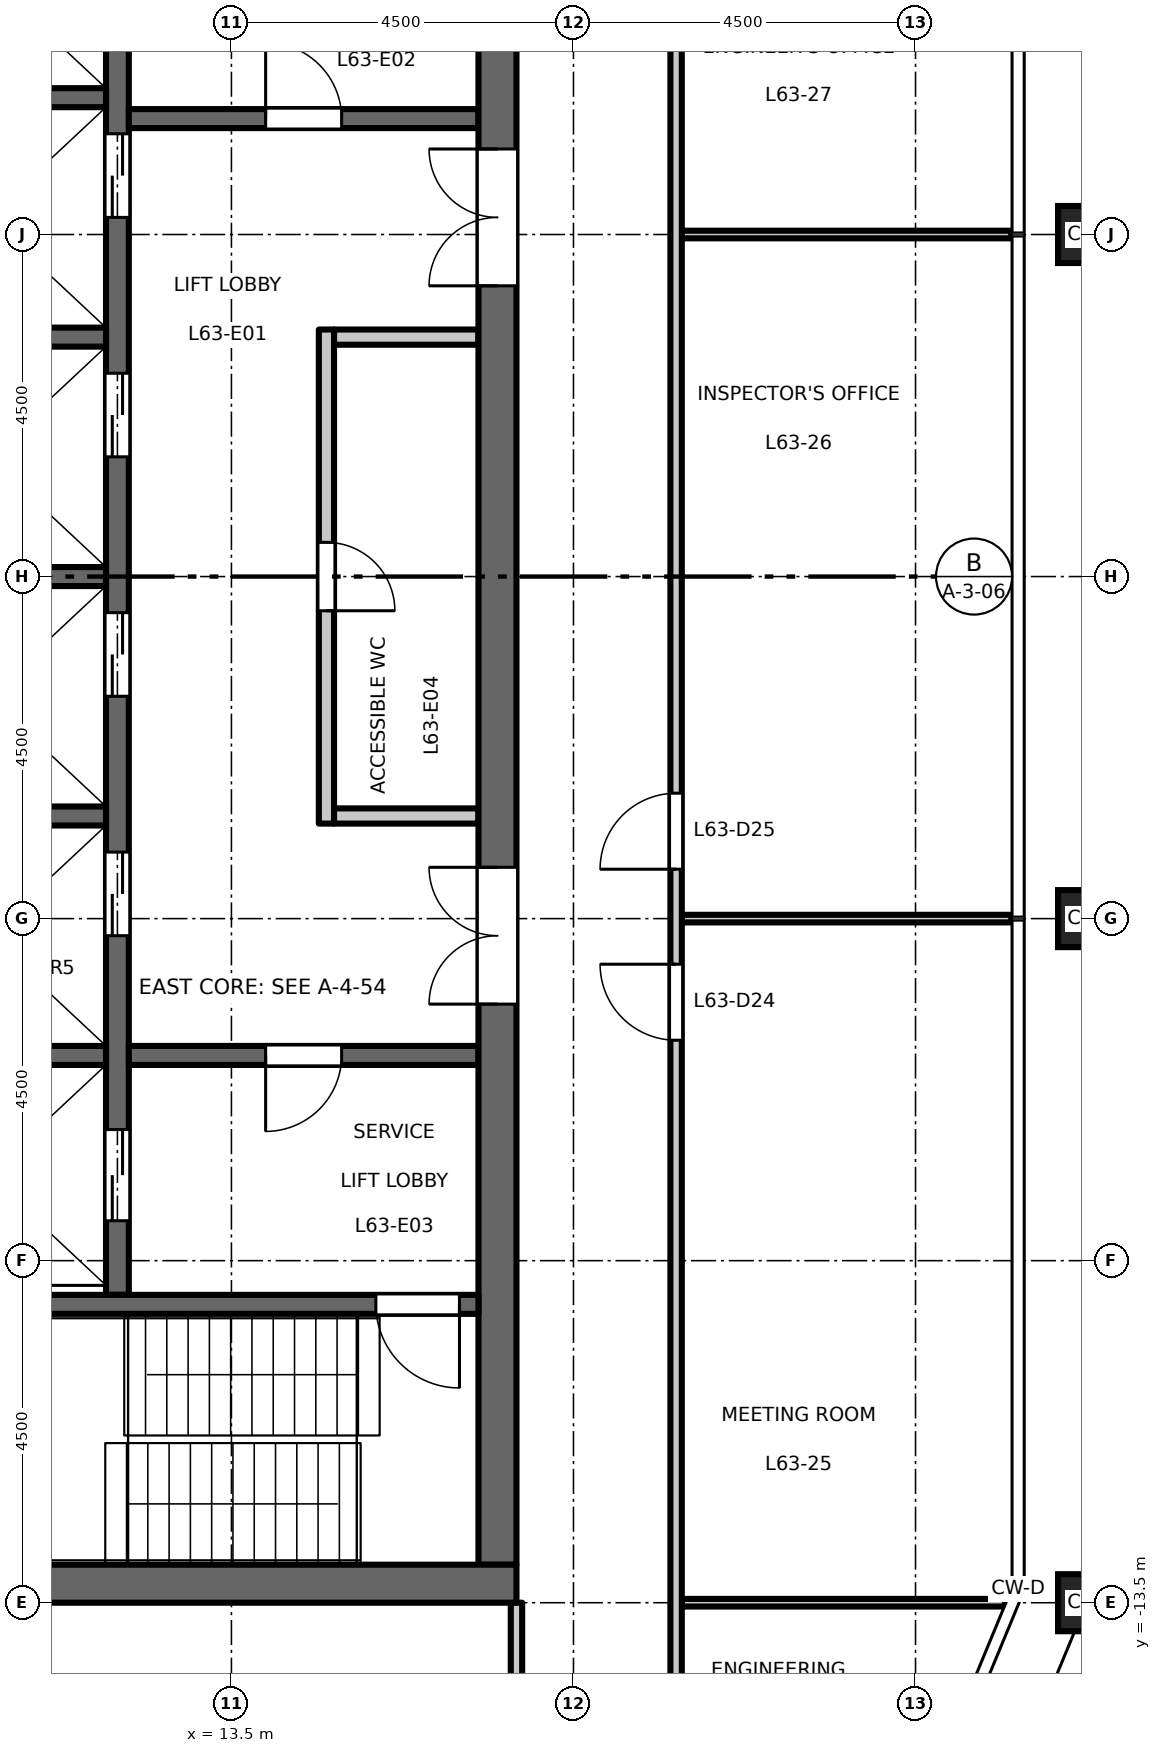
"""IFC4 building model, lengths in metres.
Left out: names, types, materials, properties, quantities, classifications, styles, units other than length and angle.
Written with IfcOpenShell. Run it as: python <this file> out.ifc"""

import sys

from ifc_helpers import new_model, si_unit, direction, frame, frame_2d, origin, origin_2d, place, context, subcontext, project, spatial, rectangle, hollow_rectangle, extrude, element, fill, save


model = new_model("IFC4")
c1 = context("Model", 3, precision=1e-05, world=origin(), true_north=direction((0.0, 1.0)))
c2 = subcontext(c1, "Body", "Model", "MODEL_VIEW")
j1 = project(units=[si_unit("LENGTHUNIT", "METRE"), si_unit("PLANEANGLEUNIT", "RADIAN")], contexts=[c1])
p1 = place(None, origin())
s1 = spatial("IfcSite", under=j1, at=p1, CompositionType="ELEMENT")
p2 = place(p1, origin())
s2 = spatial("IfcBuilding", under=s1, at=p2, CompositionType="ELEMENT")
p3 = place(p2, frame((0.0, 0.0, 294.2)))
s3 = spatial("IfcBuildingStorey", under=s2, at=p3, CompositionType="ELEMENT", Elevation=294.2)
for number, where, z_axis, x_axis in (
    (1, (24.75, -13.5, 0.0), (0.0, 0.0, 1.0), (1.0, 0.0, 0.0)),
    (2, (24.75, -4.5, 0.0), (0.0, 0.0, 1.0), (1.0, 0.0, 0.0)),
    (3, (24.75, 4.5, 0.0), (0.0, 0.0, 1.0), (1.0, 0.0, 0.0)),
):
    element("IfcColumn", number, at=place(p3, frame(where, z_axis=z_axis, x_axis=x_axis)), inside=s3, PredefinedType="COLUMN", context=c2, shape_type="SweptSolid", body=[
        extrude(hollow_rectangle(XDim=0.75, YDim=0.75, WallThickness=0.04, at=origin_2d()), origin(), (0.0, 0.0, 1.0), 4.5),
    ])
p4 = place(p3, frame((14.75, -3.25, 0.0), z_axis=(0.0, 0.0, 1.0), x_axis=(0.0, 1.0, 0.0)))
e4 = element("IfcWall", 4, at=p4, inside=s3, PredefinedType="PARTITIONING", context=c2, shape_type="SweptSolid", body=[
    extrude(rectangle(XDim=6.5, YDim=0.2, at=frame_2d((3.25, 0.0))), origin(), (0.0, 0.0, 1.0), 4.35),
])
p5 = place(p4, frame((2.8, 0.0, 0.0)))
e5 = element("IfcOpeningElement", 5, at=p5, cuts=e4, PredefinedType="OPENING", context=c2, shape_type="SweptSolid", body=[
    extrude(rectangle(XDim=0.9, YDim=2.1, at=frame_2d((0.45, 1.05))), frame((0.0, 0.11, 0.0), z_axis=(0.0, -1.0, 0.0), x_axis=(1.0, 0.0, 0.0)), (0.0, 0.0, 1.0), 0.22),
])
for number, where, z_axis, x_axis in (
    (6, (14.85, 3.15, 0.0), (0.0, 0.0, 1.0), (1.0, 0.0, 0.0)),
    (7, (14.85, -3.15, 0.0), (0.0, 0.0, 1.0), (1.0, 0.0, 0.0)),
):
    element("IfcWall", number, at=place(p3, frame(where, z_axis=z_axis, x_axis=x_axis)), inside=s3, PredefinedType="PARTITIONING", context=c2, shape_type="SweptSolid", body=[
        extrude(rectangle(XDim=1.9, YDim=0.2, at=frame_2d((0.95, 0.0))), origin(), (0.0, 0.0, 1.0), 4.35),
    ])
p6 = place(p3, frame((12.0, -9.45, 0.0), z_axis=(0.0, 0.0, 1.0), x_axis=(0.0, 1.0, 0.0)))
e8 = element("IfcWall", 8, at=p6, inside=s3, PredefinedType="SHEAR", context=c2, shape_type="SweptSolid", body=[
    extrude(rectangle(XDim=18.9, YDim=0.3, at=frame_2d((9.45, 0.0))), origin(), (0.0, 0.0, 1.0), 4.35),
])
p7 = place(p6, frame((4.725, 0.0, 0.0)))
e9 = element("IfcOpeningElement", 9, at=p7, cuts=e8, PredefinedType="OPENING", context=c2, shape_type="SweptSolid", body=[
    extrude(rectangle(XDim=1.1, YDim=2.1, at=frame_2d((0.55, 1.05))), frame((0.0, 0.16, 0.0), z_axis=(0.0, -1.0, 0.0), x_axis=(1.0, 0.0, 0.0)), (0.0, 0.0, 1.0), 0.32),
])
p8 = place(p6, frame((7.875, 0.0, 0.0)))
e10 = element("IfcOpeningElement", 10, at=p8, cuts=e8, PredefinedType="OPENING", context=c2, shape_type="SweptSolid", body=[
    extrude(rectangle(XDim=1.1, YDim=2.1, at=frame_2d((0.55, 1.05))), frame((0.0, 0.16, 0.0), z_axis=(0.0, -1.0, 0.0), x_axis=(1.0, 0.0, 0.0)), (0.0, 0.0, 1.0), 0.32),
])
p9 = place(p6, frame((11.025, 0.0, 0.0)))
e11 = element("IfcOpeningElement", 11, at=p9, cuts=e8, PredefinedType="OPENING", context=c2, shape_type="SweptSolid", body=[
    extrude(rectangle(XDim=1.1, YDim=2.1, at=frame_2d((0.55, 1.05))), frame((0.0, 0.16, 0.0), z_axis=(0.0, -1.0, 0.0), x_axis=(1.0, 0.0, 0.0)), (0.0, 0.0, 1.0), 0.32),
])
p10 = place(p6, frame((14.175, 0.0, 0.0)))
e12 = element("IfcOpeningElement", 12, at=p10, cuts=e8, PredefinedType="OPENING", context=c2, shape_type="SweptSolid", body=[
    extrude(rectangle(XDim=1.1, YDim=2.1, at=frame_2d((0.55, 1.05))), frame((0.0, 0.16, 0.0), z_axis=(0.0, -1.0, 0.0), x_axis=(1.0, 0.0, 0.0)), (0.0, 0.0, 1.0), 0.32),
])
p11 = place(p6, frame((16.725, 0.0, 0.0)))
e13 = element("IfcOpeningElement", 13, at=p11, cuts=e8, PredefinedType="OPENING", context=c2, shape_type="SweptSolid", body=[
    extrude(rectangle(XDim=1.2, YDim=2.1, at=frame_2d((0.6, 1.05))), frame((0.0, 0.16, 0.0), z_axis=(0.0, -1.0, 0.0), x_axis=(1.0, 0.0, 0.0)), (0.0, 0.0, 1.0), 0.32),
])
p12 = place(p6, frame((0.975, 0.0, 0.0)))
e14 = element("IfcOpeningElement", 14, at=p12, cuts=e8, PredefinedType="OPENING", context=c2, shape_type="SweptSolid", body=[
    extrude(rectangle(XDim=1.2, YDim=2.1, at=frame_2d((0.6, 1.05))), frame((0.0, 0.16, 0.0), z_axis=(0.0, -1.0, 0.0), x_axis=(1.0, 0.0, 0.0)), (0.0, 0.0, 1.0), 0.32),
])
p13 = place(p3, frame((12.15, 6.025, 0.0), z_axis=(0.0, 0.0, 1.0), x_axis=(1.0, 0.0, 0.0)))
e15 = element("IfcWall", 15, at=p13, inside=s3, PredefinedType="SHEAR", context=c2, shape_type="SweptSolid", body=[
    extrude(rectangle(XDim=4.6, YDim=0.25, at=frame_2d((2.3, 0.0))), origin(), (0.0, 0.0, 1.0), 4.35),
])
p14 = place(p13, frame((1.8, 0.0, 0.0)))
e16 = element("IfcOpeningElement", 16, at=p14, cuts=e15, PredefinedType="OPENING", context=c2, shape_type="SweptSolid", body=[
    extrude(rectangle(XDim=1.0, YDim=2.1, at=frame_2d((0.5, 1.05))), frame((0.0, 0.135, 0.0), z_axis=(0.0, -1.0, 0.0), x_axis=(1.0, 0.0, 0.0)), (0.0, 0.0, 1.0), 0.27),
])
p15 = place(p3, frame((12.15, -6.3, 0.0), z_axis=(0.0, 0.0, 1.0), x_axis=(1.0, 0.0, 0.0)))
e17 = element("IfcWall", 17, at=p15, inside=s3, PredefinedType="SHEAR", context=c2, shape_type="SweptSolid", body=[
    extrude(rectangle(XDim=4.6, YDim=0.25, at=frame_2d((2.3, 0.0))), origin(), (0.0, 0.0, 1.0), 4.35),
])
p16 = place(p15, frame((1.8, 0.0, 0.0)))
e18 = element("IfcOpeningElement", 18, at=p16, cuts=e17, PredefinedType="OPENING", context=c2, shape_type="SweptSolid", body=[
    extrude(rectangle(XDim=1.0, YDim=2.1, at=frame_2d((0.5, 1.05))), frame((0.0, 0.135, 0.0), z_axis=(0.0, -1.0, 0.0), x_axis=(1.0, 0.0, 0.0)), (0.0, 0.0, 1.0), 0.27),
])
p17 = place(p3, frame((17.0, -13.0, 0.0), z_axis=(0.0, 0.0, 1.0), x_axis=(0.0, 1.0, 0.0)))
e19 = element("IfcWall", 19, at=p17, inside=s3, PredefinedType="SHEAR", context=c2, shape_type="SweptSolid", body=[
    extrude(rectangle(XDim=26.0, YDim=0.5, at=frame_2d((13.0, 0.0))), origin(), (0.0, 0.0, 1.0), 4.35),
])
p18 = place(p17, frame((16.825, 0.0, 0.0)))
e20 = element("IfcOpeningElement", 20, at=p18, cuts=e19, PredefinedType="OPENING", context=c2, shape_type="SweptSolid", body=[
    extrude(rectangle(XDim=1.8, YDim=2.1, at=frame_2d((0.9, 1.05))), frame((0.0, 0.26, 0.0), z_axis=(0.0, -1.0, 0.0), x_axis=(1.0, 0.0, 0.0)), (0.0, 0.0, 1.0), 0.52),
])
p19 = place(p17, frame((7.375, 0.0, 0.0)))
e21 = element("IfcOpeningElement", 21, at=p19, cuts=e19, PredefinedType="OPENING", context=c2, shape_type="SweptSolid", body=[
    extrude(rectangle(XDim=1.8, YDim=2.1, at=frame_2d((0.9, 1.05))), frame((0.0, 0.26, 0.0), z_axis=(0.0, -1.0, 0.0), x_axis=(1.0, 0.0, 0.0)), (0.0, 0.0, 1.0), 0.52),
])
for number, where, z_axis, x_axis in (
    (22, (8.75, 0.0, 0.0), (0.0, 0.0, 1.0), (1.0, 0.0, 0.0)),
    (23, (8.75, 3.15, 0.0), (0.0, 0.0, 1.0), (1.0, 0.0, 0.0)),
    (24, (8.75, 6.3, 0.0), (0.0, 0.0, 1.0), (1.0, 0.0, 0.0)),
    (25, (8.75, -3.15, 0.0), (0.0, 0.0, 1.0), (1.0, 0.0, 0.0)),
    (26, (8.75, -6.3, 0.0), (0.0, 0.0, 1.0), (1.0, 0.0, 0.0)),
):
    element("IfcWall", number, at=place(p3, frame(where, z_axis=z_axis, x_axis=x_axis)), inside=s3, PredefinedType="SHEAR", context=c2, shape_type="SweptSolid", body=[
        extrude(rectangle(XDim=3.1, YDim=0.25, at=frame_2d((1.55, 0.0))), origin(), (0.0, 0.0, 1.0), 4.35),
    ])
p20 = place(p3, frame((8.75, -9.575, 0.0), z_axis=(0.0, 0.0, 1.0), x_axis=(1.0, 0.0, 0.0)))
e27 = element("IfcWall", 27, at=p20, inside=s3, PredefinedType="SHEAR", context=c2, shape_type="SweptSolid", body=[
    extrude(rectangle(XDim=8.0, YDim=0.25, at=frame_2d((4.0, 0.0))), origin(), (0.0, 0.0, 1.0), 4.35),
])
p21 = place(p20, frame((6.65, 0.0, 0.0)))
e28 = element("IfcOpeningElement", 28, at=p21, cuts=e27, PredefinedType="OPENING", context=c2, shape_type="SweptSolid", body=[
    extrude(rectangle(XDim=1.1, YDim=2.1, at=frame_2d((0.55, 1.05))), frame((0.0, 0.135, 0.0), z_axis=(0.0, -1.0, 0.0), x_axis=(1.0, 0.0, 0.0)), (0.0, 0.0, 1.0), 0.27),
])
p22 = place(p3, frame((8.25, -13.25, 0.0), z_axis=(0.0, 0.0, 1.0), x_axis=(1.0, 0.0, 0.0)))
e29 = element("IfcWall", 29, at=p22, inside=s3, PredefinedType="SHEAR", context=c2, shape_type="SweptSolid", body=[
    extrude(rectangle(XDim=9.0, YDim=0.5, at=frame_2d((4.5, 0.0))), origin(), (0.0, 0.0, 1.0), 4.35),
])
p23 = place(p3, frame((19.425, -13.5, 0.0), z_axis=(0.0, 0.0, 1.0), x_axis=(1.0, 0.0, 0.0)))
e30 = element("IfcWall", 30, at=p23, inside=s3, PredefinedType="PARTITIONING", context=c2, shape_type="SweptSolid", body=[
    extrude(rectangle(XDim=4.253, YDim=0.1, at=frame_2d((2.126, 0.0))), origin(), (0.0, 0.0, 1.0), 4.35),
])
for number, where, z_axis, x_axis in (
    (31, (19.425, -4.5, 0.0), (0.0, 0.0, 1.0), (1.0, 0.0, 0.0)),
    (32, (19.425, 4.5, 0.0), (0.0, 0.0, 1.0), (1.0, 0.0, 0.0)),
):
    element("IfcWall", number, at=place(p3, frame(where, z_axis=z_axis, x_axis=x_axis)), inside=s3, PredefinedType="PARTITIONING", context=c2, shape_type="SweptSolid", body=[
        extrude(rectangle(XDim=4.335, YDim=0.1, at=frame_2d((2.167, 0.0))), origin(), (0.0, 0.0, 1.0), 4.35),
    ])
p24 = place(p3, frame((17.25, -16.425, 0.0), z_axis=(0.0, 0.0, 1.0), x_axis=(0.0, 1.0, 0.0)))
e33 = element("IfcWall", 33, at=p24, inside=s3, PredefinedType="PARTITIONING", context=c2, shape_type="SweptSolid", body=[
    extrude(rectangle(XDim=2.925, YDim=0.15, at=frame_2d((1.462, 0.0))), origin(), (0.0, 0.0, 1.0), 4.35),
])
p25 = place(p3, frame((19.35, -16.425, 0.0), z_axis=(0.0, 0.0, 1.0), x_axis=(0.0, 1.0, 0.0)))
e34 = element("IfcWall", 34, at=p25, inside=s3, PredefinedType="PARTITIONING", context=c2, shape_type="SweptSolid", body=[
    extrude(rectangle(XDim=32.85, YDim=0.15, at=frame_2d((16.425, 0.0))), origin(), (0.0, 0.0, 1.0), 4.35),
])
p26 = place(p25, frame((10.325, 0.0, 0.0)))
e35 = element("IfcOpeningElement", 35, at=p26, cuts=e34, PredefinedType="OPENING", context=c2, shape_type="SweptSolid", body=[
    extrude(rectangle(XDim=1.0, YDim=2.1, at=frame_2d((0.5, 1.05))), frame((0.0, 0.085, 0.0), z_axis=(0.0, -1.0, 0.0), x_axis=(1.0, 0.0, 0.0)), (0.0, 0.0, 1.0), 0.17),
])
p27 = place(p25, frame((12.575, 0.0, 0.0)))
e36 = element("IfcOpeningElement", 36, at=p27, cuts=e34, PredefinedType="OPENING", context=c2, shape_type="SweptSolid", body=[
    extrude(rectangle(XDim=1.0, YDim=2.1, at=frame_2d((0.5, 1.05))), frame((0.0, 0.085, 0.0), z_axis=(0.0, -1.0, 0.0), x_axis=(1.0, 0.0, 0.0)), (0.0, 0.0, 1.0), 0.17),
])
p28 = place(p25, frame((28.325, 0.0, 0.0)))
e37 = element("IfcOpeningElement", 37, at=p28, cuts=e34, PredefinedType="OPENING", context=c2, shape_type="SweptSolid", body=[
    extrude(rectangle(XDim=1.0, YDim=2.1, at=frame_2d((0.5, 1.05))), frame((0.0, 0.085, 0.0), z_axis=(0.0, -1.0, 0.0), x_axis=(1.0, 0.0, 0.0)), (0.0, 0.0, 1.0), 0.17),
])
p29 = place(p14, origin())
e38 = element("IfcDoor", 38, at=p29, inside=s3, OperationType="SINGLE_SWING_RIGHT", PredefinedType="DOOR", context=c2, shape_type="SweptSolid", body=[
    extrude(rectangle(XDim=1.0, YDim=2.1, at=frame_2d((0.5, 1.05))), frame((0.0, 0.025, 0.0), z_axis=(0.0, -1.0, 0.0), x_axis=(1.0, 0.0, 0.0)), (0.0, 0.0, 1.0), 0.05),
])
fill(e16, e38)
p30 = place(p16, origin())
e39 = element("IfcDoor", 39, at=p30, inside=s3, OperationType="SINGLE_SWING_LEFT", PredefinedType="DOOR", context=c2, shape_type="SweptSolid", body=[
    extrude(rectangle(XDim=1.0, YDim=2.1, at=frame_2d((0.5, 1.05))), frame((0.0, 0.025, 0.0), z_axis=(0.0, -1.0, 0.0), x_axis=(1.0, 0.0, 0.0)), (0.0, 0.0, 1.0), 0.05),
])
fill(e18, e39)
p31 = place(p21, origin())
e40 = element("IfcDoor", 40, at=p31, inside=s3, OperationType="SINGLE_SWING_RIGHT", PredefinedType="DOOR", context=c2, shape_type="SweptSolid", body=[
    extrude(rectangle(XDim=1.1, YDim=2.1, at=frame_2d((0.55, 1.05))), frame((0.0, 0.025, 0.0), z_axis=(0.0, -1.0, 0.0), x_axis=(1.0, 0.0, 0.0)), (0.0, 0.0, 1.0), 0.05),
])
fill(e28, e40)
p32 = place(p18, origin())
e41 = element("IfcDoor", 41, at=p32, inside=s3, OperationType="DOUBLE_DOOR_DOUBLE_SWING", PredefinedType="DOOR", context=c2, shape_type="SweptSolid", body=[
    extrude(rectangle(XDim=1.8, YDim=2.1, at=frame_2d((0.9, 1.05))), frame((0.0, 0.025, 0.0), z_axis=(0.0, -1.0, 0.0), x_axis=(1.0, 0.0, 0.0)), (0.0, 0.0, 1.0), 0.05),
])
fill(e20, e41)
p33 = place(p19, origin())
e42 = element("IfcDoor", 42, at=p33, inside=s3, OperationType="DOUBLE_DOOR_DOUBLE_SWING", PredefinedType="DOOR", context=c2, shape_type="SweptSolid", body=[
    extrude(rectangle(XDim=1.8, YDim=2.1, at=frame_2d((0.9, 1.05))), frame((0.0, 0.025, 0.0), z_axis=(0.0, -1.0, 0.0), x_axis=(1.0, 0.0, 0.0)), (0.0, 0.0, 1.0), 0.05),
])
fill(e21, e42)
p34 = place(p7, origin())
e43 = element("IfcDoor", 43, at=p34, inside=s3, OperationType="DOUBLE_DOOR_SLIDING", PredefinedType="DOOR", context=c2, shape_type="SweptSolid", body=[
    extrude(rectangle(XDim=1.1, YDim=2.1, at=frame_2d((0.55, 1.05))), frame((0.0, 0.025, 0.0), z_axis=(0.0, -1.0, 0.0), x_axis=(1.0, 0.0, 0.0)), (0.0, 0.0, 1.0), 0.05),
])
fill(e9, e43)
p35 = place(p8, origin())
e44 = element("IfcDoor", 44, at=p35, inside=s3, OperationType="DOUBLE_DOOR_SLIDING", PredefinedType="DOOR", context=c2, shape_type="SweptSolid", body=[
    extrude(rectangle(XDim=1.1, YDim=2.1, at=frame_2d((0.55, 1.05))), frame((0.0, 0.025, 0.0), z_axis=(0.0, -1.0, 0.0), x_axis=(1.0, 0.0, 0.0)), (0.0, 0.0, 1.0), 0.05),
])
fill(e10, e44)
p36 = place(p9, origin())
e45 = element("IfcDoor", 45, at=p36, inside=s3, OperationType="DOUBLE_DOOR_SLIDING", PredefinedType="DOOR", context=c2, shape_type="SweptSolid", body=[
    extrude(rectangle(XDim=1.1, YDim=2.1, at=frame_2d((0.55, 1.05))), frame((0.0, 0.025, 0.0), z_axis=(0.0, -1.0, 0.0), x_axis=(1.0, 0.0, 0.0)), (0.0, 0.0, 1.0), 0.05),
])
fill(e11, e45)
p37 = place(p10, origin())
e46 = element("IfcDoor", 46, at=p37, inside=s3, OperationType="DOUBLE_DOOR_SLIDING", PredefinedType="DOOR", context=c2, shape_type="SweptSolid", body=[
    extrude(rectangle(XDim=1.1, YDim=2.1, at=frame_2d((0.55, 1.05))), frame((0.0, 0.025, 0.0), z_axis=(0.0, -1.0, 0.0), x_axis=(1.0, 0.0, 0.0)), (0.0, 0.0, 1.0), 0.05),
])
fill(e12, e46)
p38 = place(p12, origin())
e47 = element("IfcDoor", 47, at=p38, inside=s3, OperationType="DOUBLE_DOOR_SLIDING", PredefinedType="DOOR", context=c2, shape_type="SweptSolid", body=[
    extrude(rectangle(XDim=1.2, YDim=2.1, at=frame_2d((0.6, 1.05))), frame((0.0, 0.025, 0.0), z_axis=(0.0, -1.0, 0.0), x_axis=(1.0, 0.0, 0.0)), (0.0, 0.0, 1.0), 0.05),
])
fill(e14, e47)
p39 = place(p5, origin())
e48 = element("IfcDoor", 48, at=p39, inside=s3, OperationType="SINGLE_SWING_LEFT", PredefinedType="DOOR", context=c2, shape_type="SweptSolid", body=[
    extrude(rectangle(XDim=0.9, YDim=2.1, at=frame_2d((0.45, 1.05))), frame((0.0, 0.025, 0.0), z_axis=(0.0, -1.0, 0.0), x_axis=(1.0, 0.0, 0.0)), (0.0, 0.0, 1.0), 0.05),
])
fill(e5, e48)
p40 = place(p26, origin())
e49 = element("IfcDoor", 49, at=p40, inside=s3, OperationType="SINGLE_SWING_RIGHT", PredefinedType="DOOR", context=c2, shape_type="SweptSolid", body=[
    extrude(rectangle(XDim=1.0, YDim=2.1, at=frame_2d((0.5, 1.05))), frame((0.0, 0.025, 0.0), z_axis=(0.0, -1.0, 0.0), x_axis=(1.0, 0.0, 0.0)), (0.0, 0.0, 1.0), 0.05),
])
fill(e35, e49)
p41 = place(p27, origin())
e50 = element("IfcDoor", 50, at=p41, inside=s3, OperationType="SINGLE_SWING_LEFT", PredefinedType="DOOR", context=c2, shape_type="SweptSolid", body=[
    extrude(rectangle(XDim=1.0, YDim=2.1, at=frame_2d((0.5, 1.05))), frame((0.0, 0.025, 0.0), z_axis=(0.0, -1.0, 0.0), x_axis=(1.0, 0.0, 0.0)), (0.0, 0.0, 1.0), 0.05),
])
fill(e36, e50)
save(model, sys.argv[1])
